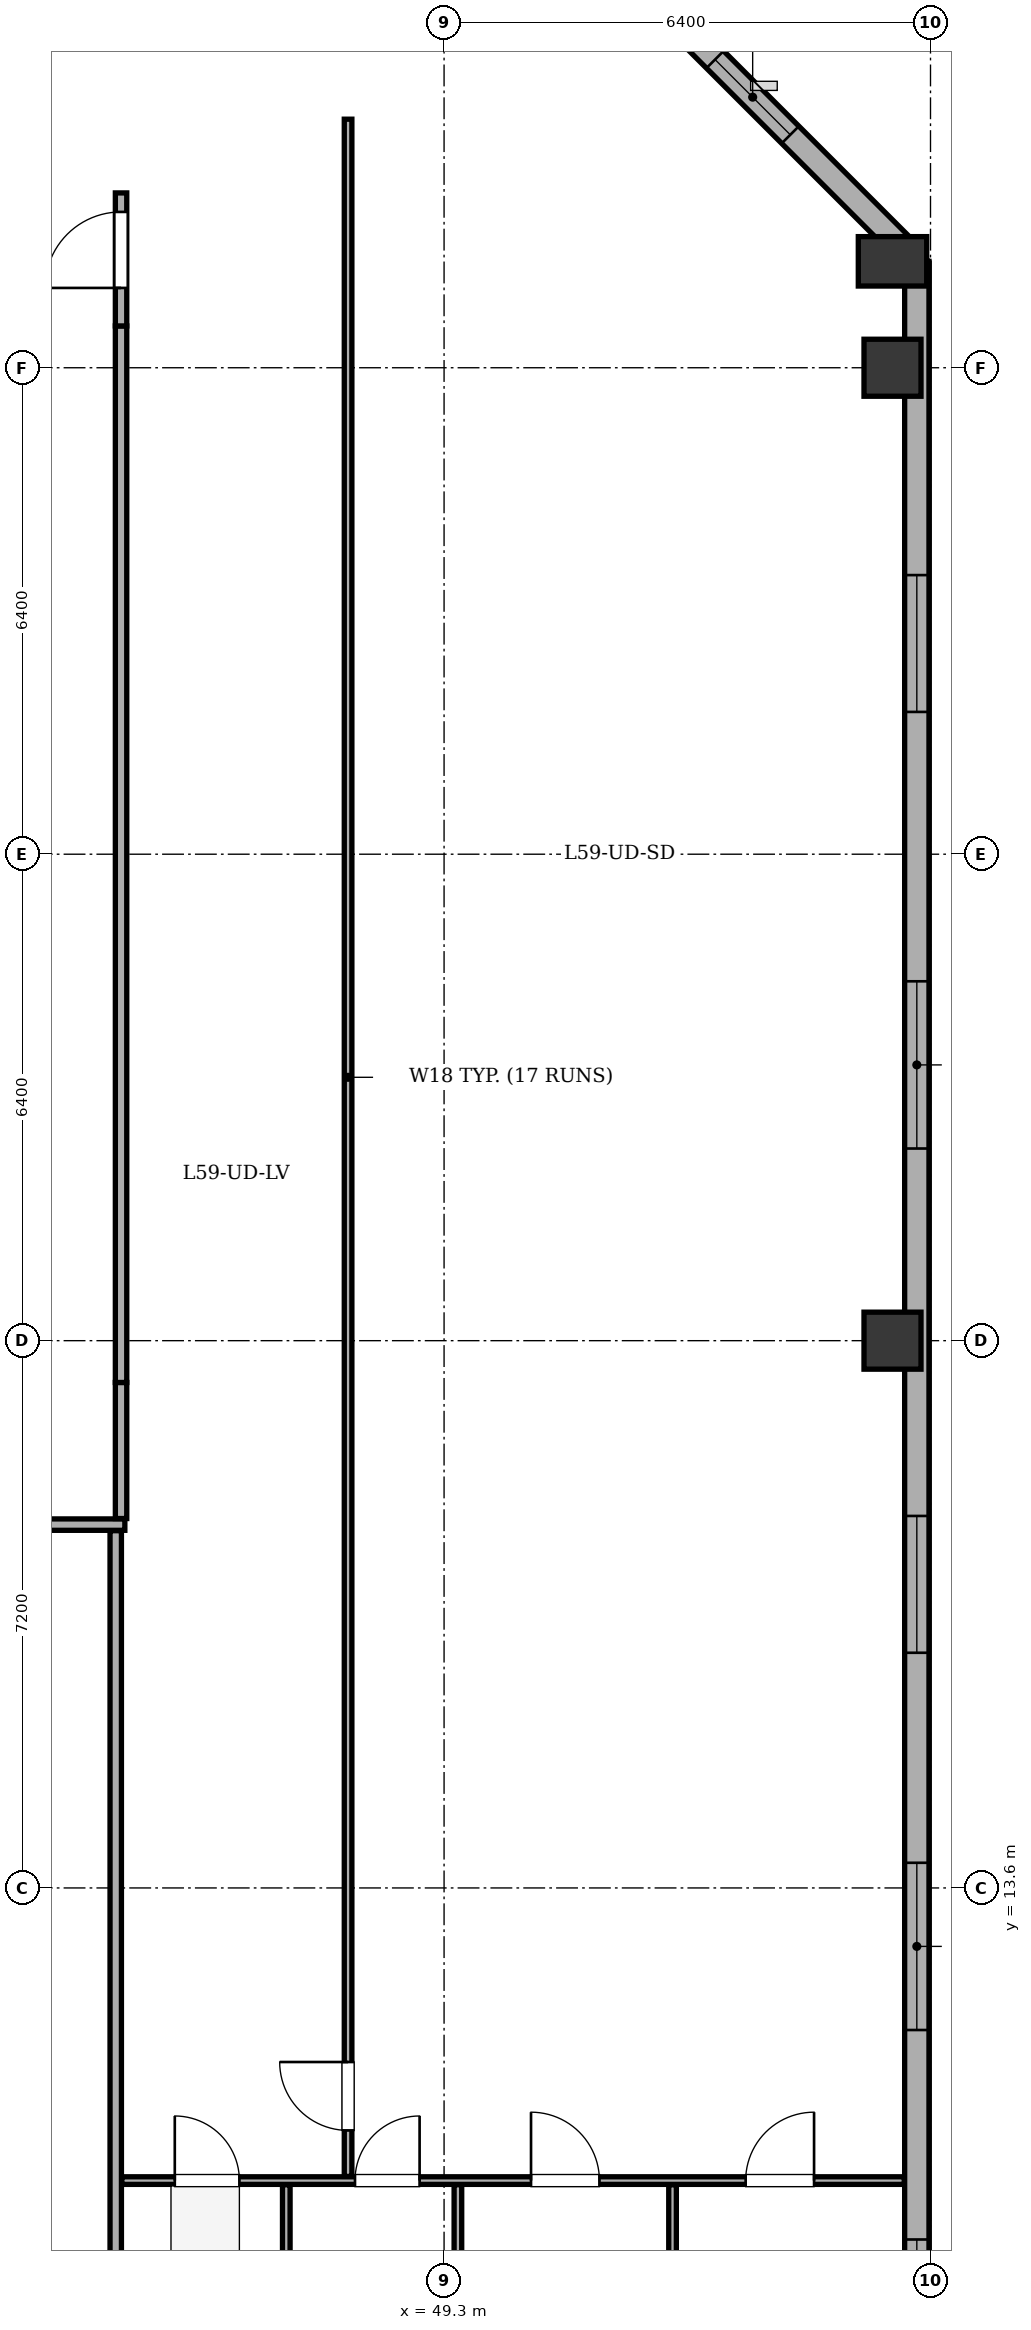
"""IFC4 building model, lengths in metres.
Left out: names, types, materials, properties, quantities, classifications, styles, units other than length and angle.
Written with IfcOpenShell. Run it as: python <this file> out.ifc"""

import sys

from ifc_helpers import new_model, si_unit, direction, frame, frame_2d, origin, origin_2d, place, context, subcontext, project, spatial, rectangle, extrude, element, fill, save


model = new_model("IFC4")
c1 = context("Model", 3, precision=1e-05, world=origin(), true_north=direction((0.0, 1.0)))
c2 = subcontext(c1, "Body", "Model", "MODEL_VIEW")
j1 = project(units=[si_unit("LENGTHUNIT", "METRE"), si_unit("PLANEANGLEUNIT", "RADIAN")], contexts=[c1])
p1 = place(None, origin())
s1 = spatial("IfcSite", under=j1, at=p1, CompositionType="ELEMENT")
p2 = place(p1, origin())
s2 = spatial("IfcBuilding", under=s1, at=p2, CompositionType="ELEMENT")
p3 = place(p2, frame((0.0, 0.0, 227.9)))
s3 = spatial("IfcBuildingStorey", under=s2, at=p3, CompositionType="ELEMENT", Elevation=227.9)
for number, where, z_axis, x_axis in (
    (1, (55.2, 20.8, 0.0), (0.0, 0.0, 1.0), (1.0, 0.0, 0.0)),
    (2, (55.2, 33.6, 0.0), (0.0, 0.0, 1.0), (1.0, 0.0, 0.0)),
):
    element("IfcColumn", number, at=place(p3, frame(where, z_axis=z_axis, x_axis=x_axis)), inside=s3, PredefinedType="COLUMN", context=c2, shape_type="SweptSolid", body=[
        extrude(rectangle(XDim=0.75, YDim=0.75, at=origin_2d()), origin(), (0.0, 0.0, 1.0), 3.4),
    ])
p4 = place(p3, frame((55.2, 35.0, 0.0), z_axis=(0.0, 0.0, 1.0), x_axis=(1.0, 0.0, 0.0)))
e3 = element("IfcColumn", 3, at=p4, inside=s3, PredefinedType="COLUMN", context=c2, shape_type="SweptSolid", body=[
    extrude(rectangle(XDim=0.65, YDim=0.9, at=origin_2d()), origin(), (0.0, 0.0, 1.0), 3.4),
])
p5 = place(p3, frame((51.2, 39.32, 0.0), z_axis=(0.0, 0.0, 1.0), x_axis=(0.707106781187, -0.707106781187, 0.0)))
e4 = element("IfcWall", 4, at=p5, inside=s3, PredefinedType="STANDARD", context=c2, shape_type="SweptSolid", body=[
    extrude(rectangle(XDim=6.11, YDim=0.32, at=frame_2d((3.055, 0.0))), origin(), (0.0, 0.0, 1.0), 2.725),
])
p6 = place(p5, frame((2.355, 0.0, 0.75)))
e5 = element("IfcOpeningElement", 5, at=p6, cuts=e4, PredefinedType="OPENING", context=c2, shape_type="SweptSolid", body=[
    extrude(rectangle(XDim=1.4, YDim=1.65, at=frame_2d((0.7, 0.825))), frame((0.0, 0.17, 0.0), z_axis=(0.0, -1.0, 0.0), x_axis=(1.0, 0.0, 0.0)), (0.0, 0.0, 1.0), 0.34),
])
p7 = place(p3, frame((55.52, 35.0, 0.0), z_axis=(0.0, 0.0, 1.0), x_axis=(0.0, -1.0, 0.0)))
e6 = element("IfcWall", 6, at=p7, inside=s3, PredefinedType="STANDARD", context=c2, shape_type="SweptSolid", body=[
    extrude(rectangle(XDim=27.8, YDim=0.32, at=frame_2d((13.9, 0.0))), origin(), (0.0, 0.0, 1.0), 2.725),
])
p8 = place(p7, frame((4.128, 0.0, 0.75)))
e7 = element("IfcOpeningElement", 7, at=p8, cuts=e6, PredefinedType="OPENING", context=c2, shape_type="SweptSolid", body=[
    extrude(rectangle(XDim=1.8, YDim=1.7, at=frame_2d((0.9, 0.85))), frame((0.0, 0.17, 0.0), z_axis=(0.0, -1.0, 0.0), x_axis=(1.0, 0.0, 0.0)), (0.0, 0.0, 1.0), 0.34),
])
p9 = place(p7, frame((9.472, 0.0, 0.75)))
e8 = element("IfcOpeningElement", 8, at=p9, cuts=e6, PredefinedType="OPENING", context=c2, shape_type="SweptSolid", body=[
    extrude(rectangle(XDim=2.2, YDim=1.7, at=frame_2d((1.1, 0.85))), frame((0.0, 0.17, 0.0), z_axis=(0.0, -1.0, 0.0), x_axis=(1.0, 0.0, 0.0)), (0.0, 0.0, 1.0), 0.34),
])
p10 = place(p7, frame((16.506, 0.0, 0.75)))
e9 = element("IfcOpeningElement", 9, at=p10, cuts=e6, PredefinedType="OPENING", context=c2, shape_type="SweptSolid", body=[
    extrude(rectangle(XDim=1.8, YDim=1.7, at=frame_2d((0.9, 0.85))), frame((0.0, 0.17, 0.0), z_axis=(0.0, -1.0, 0.0), x_axis=(1.0, 0.0, 0.0)), (0.0, 0.0, 1.0), 0.34),
])
p11 = place(p7, frame((21.069, 0.0, 0.75)))
e10 = element("IfcOpeningElement", 10, at=p11, cuts=e6, PredefinedType="OPENING", context=c2, shape_type="SweptSolid", body=[
    extrude(rectangle(XDim=2.2, YDim=1.7, at=frame_2d((1.1, 0.85))), frame((0.0, 0.17, 0.0), z_axis=(0.0, -1.0, 0.0), x_axis=(1.0, 0.0, 0.0)), (0.0, 0.0, 1.0), 0.34),
])
p12 = place(p7, frame((26.025, 0.0, 0.75)))
e11 = element("IfcOpeningElement", 11, at=p12, cuts=e6, PredefinedType="OPENING", context=c2, shape_type="SweptSolid", body=[
    extrude(rectangle(XDim=0.75, YDim=1.45, at=frame_2d((0.375, 0.725))), frame((0.0, 0.17, 0.0), z_axis=(0.0, -1.0, 0.0), x_axis=(1.0, 0.0, 0.0)), (0.0, 0.0, 1.0), 0.34),
])
p13 = place(p3, frame((15.08, 18.38, 0.0), z_axis=(0.0, 0.0, 1.0), x_axis=(1.0, 0.0, 0.0)))
e12 = element("IfcWall", 12, at=p13, inside=s3, PredefinedType="PARTITIONING", context=c2, shape_type="SweptSolid", body=[
    extrude(rectangle(XDim=30.02, YDim=0.15, at=frame_2d((15.01, 0.0))), origin(), (0.0, 0.0, 1.0), 3.1),
])
p14 = place(p13, frame((4.385, 0.0, 0.0)))
e13 = element("IfcOpeningElement", 13, at=p14, cuts=e12, PredefinedType="OPENING", context=c2, shape_type="SweptSolid", body=[
    extrude(rectangle(XDim=1.0, YDim=2.1, at=frame_2d((0.5, 1.05))), frame((0.0, 0.085, 0.0), z_axis=(0.0, -1.0, 0.0), x_axis=(1.0, 0.0, 0.0)), (0.0, 0.0, 1.0), 0.17),
])
p15 = place(p13, frame((14.361, 0.0, 0.0)))
e14 = element("IfcOpeningElement", 14, at=p15, cuts=e12, PredefinedType="OPENING", context=c2, shape_type="SweptSolid", body=[
    extrude(rectangle(XDim=1.0, YDim=2.1, at=frame_2d((0.5, 1.05))), frame((0.0, 0.085, 0.0), z_axis=(0.0, -1.0, 0.0), x_axis=(1.0, 0.0, 0.0)), (0.0, 0.0, 1.0), 0.17),
])
p16 = place(p13, frame((24.486, 0.0, 0.0)))
e15 = element("IfcOpeningElement", 15, at=p16, cuts=e12, PredefinedType="OPENING", context=c2, shape_type="SweptSolid", body=[
    extrude(rectangle(XDim=1.0, YDim=2.1, at=frame_2d((0.5, 1.05))), frame((0.0, 0.085, 0.0), z_axis=(0.0, -1.0, 0.0), x_axis=(1.0, 0.0, 0.0)), (0.0, 0.0, 1.0), 0.17),
])
p17 = place(p3, frame((44.98, 3.045, 0.0), z_axis=(0.0, 0.0, 1.0), x_axis=(0.0, 1.0, 0.0)))
e16 = element("IfcWall", 16, at=p17, inside=s3, PredefinedType="PARTITIONING", context=c2, shape_type="SweptSolid", body=[
    extrude(rectangle(XDim=15.255, YDim=0.15, at=frame_2d((7.627, 0.0))), origin(), (0.0, 0.0, 1.0), 2.725),
])
p18 = place(p3, frame((45.05, 18.46, 0.0), z_axis=(0.0, 0.0, 1.0), x_axis=(0.0, 1.0, 0.0)))
e17 = element("IfcWall", 17, at=p18, inside=s3, PredefinedType="PARTITIONING", context=c2, shape_type="SweptSolid", body=[
    extrude(rectangle(XDim=1.79, YDim=0.15, at=frame_2d((0.895, 0.0))), origin(), (0.0, 0.0, 1.0), 2.725),
])
p19 = place(p3, frame((45.05, 20.25, 0.0), z_axis=(0.0, 0.0, 1.0), x_axis=(0.0, 1.0, 0.0)))
e18 = element("IfcWall", 18, at=p19, inside=s3, PredefinedType="PARTITIONING", context=c2, shape_type="SweptSolid", body=[
    extrude(rectangle(XDim=13.9, YDim=0.15, at=frame_2d((6.95, 0.0))), origin(), (0.0, 0.0, 1.0), 2.725),
])
p20 = place(p3, frame((45.05, 34.15, 0.0), z_axis=(0.0, 0.0, 1.0), x_axis=(0.0, 1.0, 0.0)))
e19 = element("IfcWall", 19, at=p20, inside=s3, PredefinedType="PARTITIONING", context=c2, shape_type="SweptSolid", body=[
    extrude(rectangle(XDim=1.75, YDim=0.15, at=frame_2d((0.875, 0.0))), origin(), (0.0, 0.0, 1.0), 2.725),
])
p21 = place(p20, frame((0.5, 0.0, 0.0)))
e20 = element("IfcOpeningElement", 20, at=p21, cuts=e19, PredefinedType="OPENING", context=c2, shape_type="SweptSolid", body=[
    extrude(rectangle(XDim=1.0, YDim=2.1, at=frame_2d((0.5, 1.05))), frame((0.0, 0.085, 0.0), z_axis=(0.0, -1.0, 0.0), x_axis=(1.0, 0.0, 0.0)), (0.0, 0.0, 1.0), 0.17),
])
p22 = place(p3, frame((45.06, 9.75, 0.0), z_axis=(0.0, 0.0, 1.0), x_axis=(1.0, 0.0, 0.0)))
e21 = element("IfcWall", 21, at=p22, inside=s3, PredefinedType="PARTITIONING", context=c2, shape_type="SweptSolid", body=[
    extrude(rectangle(XDim=10.295, YDim=0.1, at=frame_2d((5.147, 0.0))), origin(), (0.0, 0.0, 1.0), 3.1),
])
p23 = place(p22, frame((0.697, 0.0, 0.0)))
e22 = element("IfcOpeningElement", 22, at=p23, cuts=e21, PredefinedType="OPENING", context=c2, shape_type="SweptSolid", body=[
    extrude(rectangle(XDim=0.85, YDim=2.05, at=frame_2d((0.425, 1.025))), frame((0.0, 0.06, 0.0), z_axis=(0.0, -1.0, 0.0), x_axis=(1.0, 0.0, 0.0)), (0.0, 0.0, 1.0), 0.12),
])
p24 = place(p22, frame((3.068, 0.0, 0.0)))
e23 = element("IfcOpeningElement", 23, at=p24, cuts=e21, PredefinedType="OPENING", context=c2, shape_type="SweptSolid", body=[
    extrude(rectangle(XDim=0.85, YDim=2.05, at=frame_2d((0.425, 1.025))), frame((0.0, 0.06, 0.0), z_axis=(0.0, -1.0, 0.0), x_axis=(1.0, 0.0, 0.0)), (0.0, 0.0, 1.0), 0.12),
])
p25 = place(p22, frame((5.384, 0.0, 0.0)))
e24 = element("IfcOpeningElement", 24, at=p25, cuts=e21, PredefinedType="OPENING", context=c2, shape_type="SweptSolid", body=[
    extrude(rectangle(XDim=0.9, YDim=2.05, at=frame_2d((0.45, 1.025))), frame((0.0, 0.06, 0.0), z_axis=(0.0, -1.0, 0.0), x_axis=(1.0, 0.0, 0.0)), (0.0, 0.0, 1.0), 0.12),
])
p26 = place(p22, frame((8.208, 0.0, 0.0)))
e25 = element("IfcOpeningElement", 25, at=p26, cuts=e21, PredefinedType="OPENING", context=c2, shape_type="SweptSolid", body=[
    extrude(rectangle(XDim=0.9, YDim=2.05, at=frame_2d((0.45, 1.025))), frame((0.0, 0.06, 0.0), z_axis=(0.0, -1.0, 0.0), x_axis=(1.0, 0.0, 0.0)), (0.0, 0.0, 1.0), 0.12),
])
p27 = place(p3, frame((48.037, 9.805, 0.0), z_axis=(0.0, 0.0, 1.0), x_axis=(0.0, 1.0, 0.0)))
e26 = element("IfcWall", 26, at=p27, inside=s3, PredefinedType="PARTITIONING", context=c2, shape_type="SweptSolid", body=[
    extrude(rectangle(XDim=27.065, YDim=0.1, at=frame_2d((13.533, 0.0))), origin(), (0.0, 0.0, 1.0), 3.1),
])
p28 = place(p27, frame((0.605, 0.0, 0.0)))
e27 = element("IfcOpeningElement", 27, at=p28, cuts=e26, PredefinedType="OPENING", context=c2, shape_type="SweptSolid", body=[
    extrude(rectangle(XDim=0.9, YDim=2.05, at=frame_2d((0.45, 1.025))), frame((0.0, 0.06, 0.0), z_axis=(0.0, -1.0, 0.0), x_axis=(1.0, 0.0, 0.0)), (0.0, 0.0, 1.0), 0.12),
])
for number, where, z_axis, x_axis in (
    (28, (47.224, 7.08, 0.0), (0.0, 0.0, 1.0), (0.0, 1.0, 0.0)),
    (29, (49.482, 7.08, 0.0), (0.0, 0.0, 1.0), (0.0, 1.0, 0.0)),
):
    element("IfcWall", number, at=place(p3, frame(where, z_axis=z_axis, x_axis=x_axis)), inside=s3, PredefinedType="PARTITIONING", context=c2, shape_type="SweptSolid", body=[
        extrude(rectangle(XDim=2.615, YDim=0.1, at=frame_2d((1.308, 0.0))), origin(), (0.0, 0.0, 1.0), 2.725),
    ])
p29 = place(p3, frame((52.306, 7.08, 0.0), z_axis=(0.0, 0.0, 1.0), x_axis=(0.0, 1.0, 0.0)))
e30 = element("IfcWall", 30, at=p29, inside=s3, PredefinedType="PARTITIONING", context=c2, shape_type="SweptSolid", body=[
    extrude(rectangle(XDim=2.615, YDim=0.1, at=frame_2d((1.308, 0.0))), origin(), (0.0, 0.0, 1.0), 3.1),
])
p30 = place(p8, origin())
e31 = element("IfcWindow", 31, at=p30, inside=s3, PartitioningType="SINGLE_PANEL", PredefinedType="WINDOW", context=c2, shape_type="SweptSolid", body=[
    extrude(rectangle(XDim=1.8, YDim=1.7, at=frame_2d((0.9, 0.85))), frame((0.0, -0.01, 0.0), z_axis=(0.0, -1.0, 0.0), x_axis=(1.0, 0.0, 0.0)), (0.0, 0.0, 1.0), 0.06),
])
fill(e7, e31)
p31 = place(p9, origin())
e32 = element("IfcWindow", 32, at=p31, inside=s3, PartitioningType="SINGLE_PANEL", PredefinedType="WINDOW", context=c2, shape_type="SweptSolid", body=[
    extrude(rectangle(XDim=2.2, YDim=1.7, at=frame_2d((1.1, 0.85))), frame((0.0, -0.01, 0.0), z_axis=(0.0, -1.0, 0.0), x_axis=(1.0, 0.0, 0.0)), (0.0, 0.0, 1.0), 0.06),
])
fill(e8, e32)
p32 = place(p10, origin())
e33 = element("IfcWindow", 33, at=p32, inside=s3, PartitioningType="SINGLE_PANEL", PredefinedType="WINDOW", context=c2, shape_type="SweptSolid", body=[
    extrude(rectangle(XDim=1.8, YDim=1.7, at=frame_2d((0.9, 0.85))), frame((0.0, -0.01, 0.0), z_axis=(0.0, -1.0, 0.0), x_axis=(1.0, 0.0, 0.0)), (0.0, 0.0, 1.0), 0.06),
])
fill(e9, e33)
p33 = place(p11, origin())
e34 = element("IfcWindow", 34, at=p33, inside=s3, PartitioningType="SINGLE_PANEL", PredefinedType="WINDOW", context=c2, shape_type="SweptSolid", body=[
    extrude(rectangle(XDim=2.2, YDim=1.7, at=frame_2d((1.1, 0.85))), frame((0.0, -0.01, 0.0), z_axis=(0.0, -1.0, 0.0), x_axis=(1.0, 0.0, 0.0)), (0.0, 0.0, 1.0), 0.06),
])
fill(e10, e34)
p34 = place(p12, origin())
e35 = element("IfcWindow", 35, at=p34, inside=s3, PartitioningType="SINGLE_PANEL", PredefinedType="WINDOW", context=c2, shape_type="SweptSolid", body=[
    extrude(rectangle(XDim=0.75, YDim=1.45, at=frame_2d((0.375, 0.725))), frame((0.0, -0.01, 0.0), z_axis=(0.0, -1.0, 0.0), x_axis=(1.0, 0.0, 0.0)), (0.0, 0.0, 1.0), 0.06),
])
fill(e11, e35)
p35 = place(p6, origin())
e36 = element("IfcWindow", 36, at=p35, inside=s3, PartitioningType="SINGLE_PANEL", PredefinedType="WINDOW", context=c2, shape_type="SweptSolid", body=[
    extrude(rectangle(XDim=1.4, YDim=1.65, at=frame_2d((0.7, 0.825))), frame((0.0, -0.01, 0.0), z_axis=(0.0, -1.0, 0.0), x_axis=(1.0, 0.0, 0.0)), (0.0, 0.0, 1.0), 0.06),
])
fill(e5, e36)
p36 = place(p21, origin())
e37 = element("IfcDoor", 37, at=p36, inside=s3, OperationType="SINGLE_SWING_LEFT", PredefinedType="DOOR", context=c2, shape_type="SweptSolid", body=[
    extrude(rectangle(XDim=1.0, YDim=2.1, at=frame_2d((0.5, 1.05))), frame((0.0, 0.025, 0.0), z_axis=(0.0, -1.0, 0.0), x_axis=(1.0, 0.0, 0.0)), (0.0, 0.0, 1.0), 0.05),
])
fill(e20, e37)
p37 = place(p28, origin())
e38 = element("IfcDoor", 38, at=p37, inside=s3, OperationType="SINGLE_SWING_RIGHT", PredefinedType="DOOR", context=c2, shape_type="SweptSolid", body=[
    extrude(rectangle(XDim=0.9, YDim=2.05, at=frame_2d((0.45, 1.025))), frame((0.0, 0.025, 0.0), z_axis=(0.0, -1.0, 0.0), x_axis=(1.0, 0.0, 0.0)), (0.0, 0.0, 1.0), 0.05),
])
fill(e27, e38)
p38 = place(p23, origin())
e39 = element("IfcDoor", 39, at=p38, inside=s3, OperationType="SINGLE_SWING_LEFT", PredefinedType="DOOR", context=c2, shape_type="SweptSolid", body=[
    extrude(rectangle(XDim=0.85, YDim=2.05, at=frame_2d((0.425, 1.025))), frame((0.0, 0.025, 0.0), z_axis=(0.0, -1.0, 0.0), x_axis=(1.0, 0.0, 0.0)), (0.0, 0.0, 1.0), 0.05),
])
fill(e22, e39)
p39 = place(p24, origin())
e40 = element("IfcDoor", 40, at=p39, inside=s3, OperationType="SINGLE_SWING_RIGHT", PredefinedType="DOOR", context=c2, shape_type="SweptSolid", body=[
    extrude(rectangle(XDim=0.85, YDim=2.05, at=frame_2d((0.425, 1.025))), frame((0.0, 0.025, 0.0), z_axis=(0.0, -1.0, 0.0), x_axis=(1.0, 0.0, 0.0)), (0.0, 0.0, 1.0), 0.05),
])
fill(e23, e40)
p40 = place(p25, origin())
e41 = element("IfcDoor", 41, at=p40, inside=s3, OperationType="SINGLE_SWING_LEFT", PredefinedType="DOOR", context=c2, shape_type="SweptSolid", body=[
    extrude(rectangle(XDim=0.9, YDim=2.05, at=frame_2d((0.45, 1.025))), frame((0.0, 0.025, 0.0), z_axis=(0.0, -1.0, 0.0), x_axis=(1.0, 0.0, 0.0)), (0.0, 0.0, 1.0), 0.05),
])
fill(e24, e41)
p41 = place(p26, origin())
e42 = element("IfcDoor", 42, at=p41, inside=s3, OperationType="SINGLE_SWING_RIGHT", PredefinedType="DOOR", context=c2, shape_type="SweptSolid", body=[
    extrude(rectangle(XDim=0.9, YDim=2.05, at=frame_2d((0.45, 1.025))), frame((0.0, 0.025, 0.0), z_axis=(0.0, -1.0, 0.0), x_axis=(1.0, 0.0, 0.0)), (0.0, 0.0, 1.0), 0.05),
])
fill(e25, e42)
save(model, sys.argv[1])
